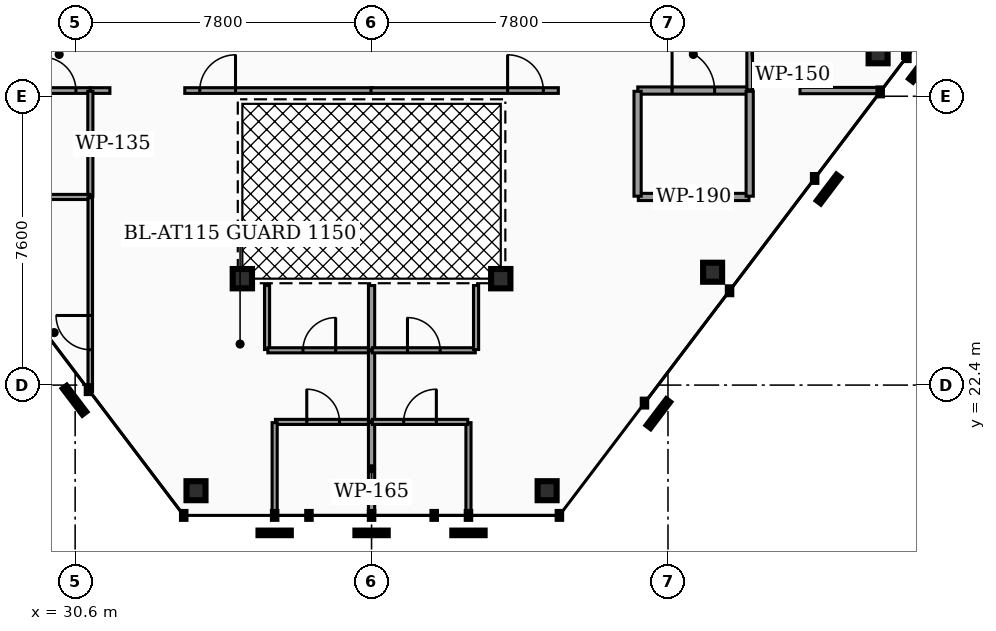
"""IFC4 building model, lengths in metres.
Left out: names, types, materials, properties, quantities, classifications, styles, units other than length and angle.
Written with IfcOpenShell. Run it as: python <this file> out.ifc"""

import sys

from ifc_helpers import new_model, si_unit, direction, frame, frame_2d, origin, origin_2d, place, context, subcontext, project, spatial, rectangle, hollow_rectangle, hollow_circle, extrude, element, fill, save


model = new_model("IFC4")
c1 = context("Model", 3, precision=1e-05, world=origin(), true_north=direction((0.0, 1.0)))
c2 = subcontext(c1, "Body", "Model", "MODEL_VIEW")
j1 = project(units=[si_unit("LENGTHUNIT", "METRE"), si_unit("PLANEANGLEUNIT", "RADIAN")], contexts=[c1])
p1 = place(None, origin())
s1 = spatial("IfcSite", under=j1, at=p1, CompositionType="ELEMENT")
p2 = place(p1, origin())
s2 = spatial("IfcBuilding", under=s1, at=p2, CompositionType="ELEMENT")
p3 = place(p2, frame((0.0, 0.0, 261.8)))
s3 = spatial("IfcBuildingStorey", under=s2, at=p3, CompositionType="ELEMENT", Elevation=261.8)
for number, where, z_axis, x_axis in (
    (1, (33.78, 19.621, 0.0), (0.0, 0.0, 1.0), (1.0, 0.0, 0.0)),
    (2, (43.02, 19.621, 0.0), (0.0, 0.0, 1.0), (1.0, 0.0, 0.0)),
    (3, (47.375, 25.369, 0.0), (0.0, 0.0, 1.0), (1.0, 0.0, 0.0)),
    (4, (51.729, 31.117, 0.0), (0.0, 0.0, 1.0), (1.0, 0.0, 0.0)),
):
    element("IfcColumn", number, at=place(p3, frame(where, z_axis=z_axis, x_axis=x_axis)), inside=s3, PredefinedType="COLUMN", context=c2, shape_type="SweptSolid", body=[
        extrude(hollow_rectangle(XDim=0.5, YDim=0.5, WallThickness=0.025, at=origin_2d()), origin(), (0.0, 0.0, 1.0), 3.18),
    ])
for number, where, z_axis, x_axis in (
    (5, (35.0, 25.2, 0.0), (0.0, 0.0, 1.0), (1.0, 0.0, 0.0)),
    (6, (41.8, 25.2, 0.0), (0.0, 0.0, 1.0), (1.0, 0.0, 0.0)),
):
    element("IfcColumn", number, at=place(p3, frame(where, z_axis=z_axis, x_axis=x_axis)), inside=s3, PredefinedType="COLUMN", context=c2, shape_type="SweptSolid", body=[
        extrude(hollow_circle(Radius=0.254, WallThickness=0.02, at=origin_2d()), origin(), (0.0, 0.0, 1.0), 3.18),
    ])
p4 = place(p3, frame((45.405, 30.15, 0.0), z_axis=(0.0, 0.0, 1.0), x_axis=(1.0, 0.0, 0.0)))
e7 = element("IfcWall", 7, at=p4, inside=s3, PredefinedType="PARTITIONING", context=c2, shape_type="SweptSolid", body=[
    extrude(rectangle(XDim=2.925, YDim=0.19, at=frame_2d((1.462, 0.0))), origin(), (0.0, 0.0, 1.0), 2.235),
])
p5 = place(p4, frame((0.903, 0.0, 0.0)))
e8 = element("IfcOpeningElement", 8, at=p5, cuts=e7, PredefinedType="OPENING", context=c2, shape_type="SweptSolid", body=[
    extrude(rectangle(XDim=1.12, YDim=2.05, at=frame_2d((0.56, 1.025))), frame((0.0, 0.105, 0.0), z_axis=(0.0, -1.0, 0.0), x_axis=(1.0, 0.0, 0.0)), (0.0, 0.0, 1.0), 0.21),
])
p6 = place(p3, frame((48.35, 30.17, 0.0), z_axis=(0.0, 0.0, 1.0), x_axis=(0.0, 1.0, 0.0)))
e9 = element("IfcWall", 9, at=p6, inside=s3, PredefinedType="PARTITIONING", context=c2, shape_type="SweptSolid", body=[
    extrude(rectangle(XDim=3.06, YDim=0.15, at=frame_2d((1.53, 0.0))), origin(), (0.0, 0.0, 1.0), 2.235),
])
p7 = place(p3, frame((29.365, 30.15, 0.0), z_axis=(0.0, 0.0, 1.0), x_axis=(1.0, 0.0, 0.0)))
e10 = element("IfcWall", 10, at=p7, inside=s3, PredefinedType="PARTITIONING", context=c2, shape_type="SweptSolid", body=[
    extrude(rectangle(XDim=1.63, YDim=0.15, at=frame_2d((0.815, 0.0))), origin(), (0.0, 0.0, 1.0), 2.235),
])
p8 = place(p7, frame((0.375, 0.0, 0.0)))
e11 = element("IfcOpeningElement", 11, at=p8, cuts=e10, PredefinedType="OPENING", context=c2, shape_type="SweptSolid", body=[
    extrude(rectangle(XDim=0.88, YDim=2.05, at=frame_2d((0.44, 1.025))), frame((0.0, 0.085, 0.0), z_axis=(0.0, -1.0, 0.0), x_axis=(1.0, 0.0, 0.0)), (0.0, 0.0, 1.0), 0.17),
])
p9 = place(p3, frame((33.485, 30.15, 0.0), z_axis=(0.0, 0.0, 1.0), x_axis=(1.0, 0.0, 0.0)))
e12 = element("IfcWall", 12, at=p9, inside=s3, PredefinedType="PARTITIONING", context=c2, shape_type="SweptSolid", body=[
    extrude(rectangle(XDim=4.93, YDim=0.15, at=frame_2d((2.465, 0.0))), origin(), (0.0, 0.0, 1.0), 2.235),
])
p10 = place(p9, frame((0.395, 0.0, 0.0)))
e13 = element("IfcOpeningElement", 13, at=p10, cuts=e12, PredefinedType="OPENING", context=c2, shape_type="SweptSolid", body=[
    extrude(rectangle(XDim=0.94, YDim=2.05, at=frame_2d((0.47, 1.025))), frame((0.0, 0.085, 0.0), z_axis=(0.0, -1.0, 0.0), x_axis=(1.0, 0.0, 0.0)), (0.0, 0.0, 1.0), 0.17),
])
p11 = place(p3, frame((31.005, 30.15, 0.0), z_axis=(0.0, 0.0, 1.0), x_axis=(1.0, 0.0, 0.0)))
e14 = element("IfcWall", 14, at=p11, inside=s3, PredefinedType="PARTITIONING", context=c2, shape_type="SweptSolid", body=[
    extrude(rectangle(XDim=0.51, YDim=0.15, at=frame_2d((0.255, 0.0))), origin(), (0.0, 0.0, 1.0), 2.235),
])
p12 = place(p3, frame((38.385, 30.15, 0.0), z_axis=(0.0, 0.0, 1.0), x_axis=(1.0, 0.0, 0.0)))
e15 = element("IfcWall", 15, at=p12, inside=s3, PredefinedType="PARTITIONING", context=c2, shape_type="SweptSolid", body=[
    extrude(rectangle(XDim=4.93, YDim=0.15, at=frame_2d((2.465, 0.0))), origin(), (0.0, 0.0, 1.0), 2.235),
])
p13 = place(p12, frame((3.595, 0.0, 0.0)))
e16 = element("IfcOpeningElement", 16, at=p13, cuts=e15, PredefinedType="OPENING", context=c2, shape_type="SweptSolid", body=[
    extrude(rectangle(XDim=0.94, YDim=2.05, at=frame_2d((0.47, 1.025))), frame((0.0, 0.085, 0.0), z_axis=(0.0, -1.0, 0.0), x_axis=(1.0, 0.0, 0.0)), (0.0, 0.0, 1.0), 0.17),
])
p14 = place(p3, frame((45.42, 27.35, 0.0), z_axis=(0.0, 0.0, 1.0), x_axis=(1.0, 0.0, 0.0)))
e17 = element("IfcWall", 17, at=p14, inside=s3, PredefinedType="PARTITIONING", context=c2, shape_type="SweptSolid", body=[
    extrude(rectangle(XDim=2.91, YDim=0.19, at=frame_2d((1.455, 0.0))), origin(), (0.0, 0.0, 1.0), 2.235),
])
for number, where, z_axis, x_axis in (
    (18, (45.4, 27.37, 0.0), (0.0, 0.0, 1.0), (0.0, 1.0, 0.0)),
    (19, (48.35, 27.37, 0.0), (0.0, 0.0, 1.0), (0.0, 1.0, 0.0)),
):
    element("IfcWall", number, at=place(p3, frame(where, z_axis=z_axis, x_axis=x_axis)), inside=s3, PredefinedType="PARTITIONING", context=c2, shape_type="SweptSolid", body=[
        extrude(rectangle(XDim=2.76, YDim=0.19, at=frame_2d((1.38, 0.0))), origin(), (0.0, 0.0, 1.0), 2.235),
    ])
p15 = place(p3, frame((31.0, 27.37, 0.0), z_axis=(0.0, 0.0, 1.0), x_axis=(0.0, 1.0, 0.0)))
e20 = element("IfcWall", 20, at=p15, inside=s3, PredefinedType="PARTITIONING", context=c2, shape_type="SweptSolid", body=[
    extrude(rectangle(XDim=2.76, YDim=0.135, at=frame_2d((1.38, 0.0))), origin(), (0.0, 0.0, 1.0), 2.235),
])
p16 = place(p3, frame((29.38, 27.35, 0.0), z_axis=(0.0, 0.0, 1.0), x_axis=(1.0, 0.0, 0.0)))
e21 = element("IfcWall", 21, at=p16, inside=s3, PredefinedType="PARTITIONING", context=c2, shape_type="SweptSolid", body=[
    extrude(rectangle(XDim=1.6, YDim=0.135, at=frame_2d((0.8, 0.0))), origin(), (0.0, 0.0, 1.0), 2.235),
])
p17 = place(p3, frame((35.65, 23.336, 0.0), z_axis=(0.0, 0.0, 1.0), x_axis=(0.0, 1.0, 0.0)))
e22 = element("IfcWall", 22, at=p17, inside=s3, PredefinedType="PARTITIONING", context=c2, shape_type="SweptSolid", body=[
    extrude(rectangle(XDim=1.684, YDim=0.135, at=frame_2d((0.842, 0.0))), origin(), (0.0, 0.0, 1.0), 2.235),
])
p18 = place(p3, frame((35.67, 23.316, 0.0), z_axis=(0.0, 0.0, 1.0), x_axis=(1.0, 0.0, 0.0)))
e23 = element("IfcWall", 23, at=p18, inside=s3, PredefinedType="PARTITIONING", context=c2, shape_type="SweptSolid", body=[
    extrude(rectangle(XDim=2.71, YDim=0.135, at=frame_2d((1.355, 0.0))), origin(), (0.0, 0.0, 1.0), 2.235),
])
p19 = place(p18, frame((0.925, 0.0, 0.0)))
e24 = element("IfcOpeningElement", 24, at=p19, cuts=e23, PredefinedType="OPENING", context=c2, shape_type="SweptSolid", body=[
    extrude(rectangle(XDim=0.86, YDim=2.05, at=frame_2d((0.43, 1.025))), frame((0.0, 0.077, 0.0), z_axis=(0.0, -1.0, 0.0), x_axis=(1.0, 0.0, 0.0)), (0.0, 0.0, 1.0), 0.155),
])
p20 = place(p3, frame((35.87, 21.431, 0.0), z_axis=(0.0, 0.0, 1.0), x_axis=(1.0, 0.0, 0.0)))
e25 = element("IfcWall", 25, at=p20, inside=s3, PredefinedType="PARTITIONING", context=c2, shape_type="SweptSolid", body=[
    extrude(rectangle(XDim=2.51, YDim=0.135, at=frame_2d((1.255, 0.0))), origin(), (0.0, 0.0, 1.0), 2.235),
])
p21 = place(p20, frame((0.825, 0.0, 0.0)))
e26 = element("IfcOpeningElement", 26, at=p21, cuts=e25, PredefinedType="OPENING", context=c2, shape_type="SweptSolid", body=[
    extrude(rectangle(XDim=0.86, YDim=2.05, at=frame_2d((0.43, 1.025))), frame((0.0, 0.077, 0.0), z_axis=(0.0, -1.0, 0.0), x_axis=(1.0, 0.0, 0.0)), (0.0, 0.0, 1.0), 0.155),
])
p22 = place(p3, frame((35.85, 18.986, 0.0), z_axis=(0.0, 0.0, 1.0), x_axis=(0.0, 1.0, 0.0)))
e27 = element("IfcWall", 27, at=p22, inside=s3, PredefinedType="PARTITIONING", context=c2, shape_type="SweptSolid", body=[
    extrude(rectangle(XDim=2.425, YDim=0.135, at=frame_2d((1.212, 0.0))), origin(), (0.0, 0.0, 1.0), 2.235),
])
p23 = place(p3, frame((30.998, 22.232, 0.0), z_axis=(0.0, 0.0, 1.0), x_axis=(0.0, 1.0, 0.0)))
e28 = element("IfcWall", 28, at=p23, inside=s3, PredefinedType="PARTITIONING", context=c2, shape_type="SweptSolid", body=[
    extrude(rectangle(XDim=5.098, YDim=0.12, at=frame_2d((2.549, 0.0))), origin(), (0.0, 0.0, 1.0), 2.235),
])
p24 = place(p23, frame((1.099, 0.0, 0.0)))
e29 = element("IfcOpeningElement", 29, at=p24, cuts=e28, PredefinedType="OPENING", context=c2, shape_type="SweptSolid", body=[
    extrude(rectangle(XDim=0.9, YDim=2.05, at=frame_2d((0.45, 1.025))), frame((0.0, 0.07, 0.0), z_axis=(0.0, -1.0, 0.0), x_axis=(1.0, 0.0, 0.0)), (0.0, 0.0, 1.0), 0.14),
])
p25 = place(p3, frame((38.4, 21.451, 0.0), z_axis=(0.0, 0.0, 1.0), x_axis=(0.0, 1.0, 0.0)))
e30 = element("IfcWall", 30, at=p25, inside=s3, PredefinedType="PARTITIONING", context=c2, shape_type="SweptSolid", body=[
    extrude(rectangle(XDim=1.844, YDim=0.165, at=frame_2d((0.922, 0.0))), origin(), (0.0, 0.0, 1.0), 2.235),
])
p26 = place(p3, frame((38.4, 23.336, 0.0), z_axis=(0.0, 0.0, 1.0), x_axis=(0.0, 1.0, 0.0)))
e31 = element("IfcWall", 31, at=p26, inside=s3, PredefinedType="PARTITIONING", context=c2, shape_type="SweptSolid", body=[
    extrude(rectangle(XDim=1.684, YDim=0.165, at=frame_2d((0.842, 0.0))), origin(), (0.0, 0.0, 1.0), 2.235),
])
p27 = place(p3, frame((38.4, 18.986, 0.0), z_axis=(0.0, 0.0, 1.0), x_axis=(0.0, 1.0, 0.0)))
e32 = element("IfcWall", 32, at=p27, inside=s3, PredefinedType="PARTITIONING", context=c2, shape_type="SweptSolid", body=[
    extrude(rectangle(XDim=2.425, YDim=0.165, at=frame_2d((1.212, 0.0))), origin(), (0.0, 0.0, 1.0), 2.235),
])
p28 = place(p3, frame((38.42, 23.316, 0.0), z_axis=(0.0, 0.0, 1.0), x_axis=(1.0, 0.0, 0.0)))
e33 = element("IfcWall", 33, at=p28, inside=s3, PredefinedType="PARTITIONING", context=c2, shape_type="SweptSolid", body=[
    extrude(rectangle(XDim=2.71, YDim=0.135, at=frame_2d((1.355, 0.0))), origin(), (0.0, 0.0, 1.0), 2.235),
])
p29 = place(p28, frame((0.925, 0.0, 0.0)))
e34 = element("IfcOpeningElement", 34, at=p29, cuts=e33, PredefinedType="OPENING", context=c2, shape_type="SweptSolid", body=[
    extrude(rectangle(XDim=0.86, YDim=2.05, at=frame_2d((0.43, 1.025))), frame((0.0, 0.077, 0.0), z_axis=(0.0, -1.0, 0.0), x_axis=(1.0, 0.0, 0.0)), (0.0, 0.0, 1.0), 0.155),
])
p30 = place(p3, frame((41.15, 23.336, 0.0), z_axis=(0.0, 0.0, 1.0), x_axis=(0.0, 1.0, 0.0)))
e35 = element("IfcWall", 35, at=p30, inside=s3, PredefinedType="PARTITIONING", context=c2, shape_type="SweptSolid", body=[
    extrude(rectangle(XDim=1.684, YDim=0.135, at=frame_2d((0.842, 0.0))), origin(), (0.0, 0.0, 1.0), 2.235),
])
p31 = place(p3, frame((40.95, 18.986, 0.0), z_axis=(0.0, 0.0, 1.0), x_axis=(0.0, 1.0, 0.0)))
e36 = element("IfcWall", 36, at=p31, inside=s3, PredefinedType="PARTITIONING", context=c2, shape_type="SweptSolid", body=[
    extrude(rectangle(XDim=2.425, YDim=0.135, at=frame_2d((1.212, 0.0))), origin(), (0.0, 0.0, 1.0), 2.235),
])
p32 = place(p3, frame((38.42, 21.431, 0.0), z_axis=(0.0, 0.0, 1.0), x_axis=(1.0, 0.0, 0.0)))
e37 = element("IfcWall", 37, at=p32, inside=s3, PredefinedType="PARTITIONING", context=c2, shape_type="SweptSolid", body=[
    extrude(rectangle(XDim=2.51, YDim=0.135, at=frame_2d((1.255, 0.0))), origin(), (0.0, 0.0, 1.0), 2.235),
])
p33 = place(p32, frame((0.825, 0.0, 0.0)))
e38 = element("IfcOpeningElement", 38, at=p33, cuts=e37, PredefinedType="OPENING", context=c2, shape_type="SweptSolid", body=[
    extrude(rectangle(XDim=0.86, YDim=2.05, at=frame_2d((0.43, 1.025))), frame((0.0, 0.077, 0.0), z_axis=(0.0, -1.0, 0.0), x_axis=(1.0, 0.0, 0.0)), (0.0, 0.0, 1.0), 0.155),
])
p34 = place(p3, frame((49.674, 30.15, 0.0), z_axis=(0.0, 0.0, 1.0), x_axis=(1.0, 0.0, 0.0)))
e39 = element("IfcWall", 39, at=p34, inside=s3, PredefinedType="PARTITIONING", context=c2, shape_type="SweptSolid", body=[
    extrude(rectangle(XDim=2.122, YDim=0.165, at=frame_2d((1.061, 0.0))), origin(), (0.0, 0.0, 1.0), 2.235),
])
p35 = place(p3, frame((52.439, 30.994, 0.0), z_axis=(0.0, 0.0, 1.0), x_axis=(0.0, 1.0, 0.0)))
e40 = element("IfcWall", 40, at=p35, inside=s3, PredefinedType="PARTITIONING", context=c2, shape_type="SweptSolid", body=[
    extrude(rectangle(XDim=1.686, YDim=0.135, at=frame_2d((0.843, 0.0))), origin(), (0.0, 0.0, 1.0), 2.235),
])
p36 = place(p5, origin())
e41 = element("IfcDoor", 41, at=p36, inside=s3, OperationType="SINGLE_SWING_LEFT", PredefinedType="DOOR", context=c2, shape_type="SweptSolid", body=[
    extrude(rectangle(XDim=1.12, YDim=2.05, at=frame_2d((0.56, 1.025))), frame((0.0, 0.025, 0.0), z_axis=(0.0, -1.0, 0.0), x_axis=(1.0, 0.0, 0.0)), (0.0, 0.0, 1.0), 0.05),
])
fill(e8, e41)
p37 = place(p8, origin())
e42 = element("IfcDoor", 42, at=p37, inside=s3, OperationType="SINGLE_SWING_LEFT", PredefinedType="DOOR", context=c2, shape_type="SweptSolid", body=[
    extrude(rectangle(XDim=0.88, YDim=2.05, at=frame_2d((0.44, 1.025))), frame((0.0, 0.025, 0.0), z_axis=(0.0, -1.0, 0.0), x_axis=(1.0, 0.0, 0.0)), (0.0, 0.0, 1.0), 0.05),
])
fill(e11, e42)
p38 = place(p10, origin())
e43 = element("IfcDoor", 43, at=p38, inside=s3, OperationType="SINGLE_SWING_RIGHT", PredefinedType="DOOR", context=c2, shape_type="SweptSolid", body=[
    extrude(rectangle(XDim=0.94, YDim=2.05, at=frame_2d((0.47, 1.025))), frame((0.0, 0.025, 0.0), z_axis=(0.0, -1.0, 0.0), x_axis=(1.0, 0.0, 0.0)), (0.0, 0.0, 1.0), 0.05),
])
fill(e13, e43)
p39 = place(p13, origin())
e44 = element("IfcDoor", 44, at=p39, inside=s3, OperationType="SINGLE_SWING_LEFT", PredefinedType="DOOR", context=c2, shape_type="SweptSolid", body=[
    extrude(rectangle(XDim=0.94, YDim=2.05, at=frame_2d((0.47, 1.025))), frame((0.0, 0.025, 0.0), z_axis=(0.0, -1.0, 0.0), x_axis=(1.0, 0.0, 0.0)), (0.0, 0.0, 1.0), 0.05),
])
fill(e16, e44)
p40 = place(p19, origin())
e45 = element("IfcDoor", 45, at=p40, inside=s3, OperationType="SINGLE_SWING_RIGHT", PredefinedType="DOOR", context=c2, shape_type="SweptSolid", body=[
    extrude(rectangle(XDim=0.86, YDim=2.05, at=frame_2d((0.43, 1.025))), frame((0.0, 0.025, 0.0), z_axis=(0.0, -1.0, 0.0), x_axis=(1.0, 0.0, 0.0)), (0.0, 0.0, 1.0), 0.05),
])
fill(e24, e45)
p41 = place(p21, origin())
e46 = element("IfcDoor", 46, at=p41, inside=s3, OperationType="SINGLE_SWING_LEFT", PredefinedType="DOOR", context=c2, shape_type="SweptSolid", body=[
    extrude(rectangle(XDim=0.86, YDim=2.05, at=frame_2d((0.43, 1.025))), frame((0.0, 0.025, 0.0), z_axis=(0.0, -1.0, 0.0), x_axis=(1.0, 0.0, 0.0)), (0.0, 0.0, 1.0), 0.05),
])
fill(e26, e46)
p42 = place(p24, origin())
e47 = element("IfcDoor", 47, at=p42, inside=s3, OperationType="SINGLE_SWING_RIGHT", PredefinedType="DOOR", context=c2, shape_type="SweptSolid", body=[
    extrude(rectangle(XDim=0.9, YDim=2.05, at=frame_2d((0.45, 1.025))), frame((0.0, 0.025, 0.0), z_axis=(0.0, -1.0, 0.0), x_axis=(1.0, 0.0, 0.0)), (0.0, 0.0, 1.0), 0.05),
])
fill(e29, e47)
p43 = place(p29, origin())
e48 = element("IfcDoor", 48, at=p43, inside=s3, OperationType="SINGLE_SWING_LEFT", PredefinedType="DOOR", context=c2, shape_type="SweptSolid", body=[
    extrude(rectangle(XDim=0.86, YDim=2.05, at=frame_2d((0.43, 1.025))), frame((0.0, 0.025, 0.0), z_axis=(0.0, -1.0, 0.0), x_axis=(1.0, 0.0, 0.0)), (0.0, 0.0, 1.0), 0.05),
])
fill(e34, e48)
p44 = place(p33, origin())
e49 = element("IfcDoor", 49, at=p44, inside=s3, OperationType="SINGLE_SWING_RIGHT", PredefinedType="DOOR", context=c2, shape_type="SweptSolid", body=[
    extrude(rectangle(XDim=0.86, YDim=2.05, at=frame_2d((0.43, 1.025))), frame((0.0, 0.025, 0.0), z_axis=(0.0, -1.0, 0.0), x_axis=(1.0, 0.0, 0.0)), (0.0, 0.0, 1.0), 0.05),
])
fill(e38, e49)
save(model, sys.argv[1])
